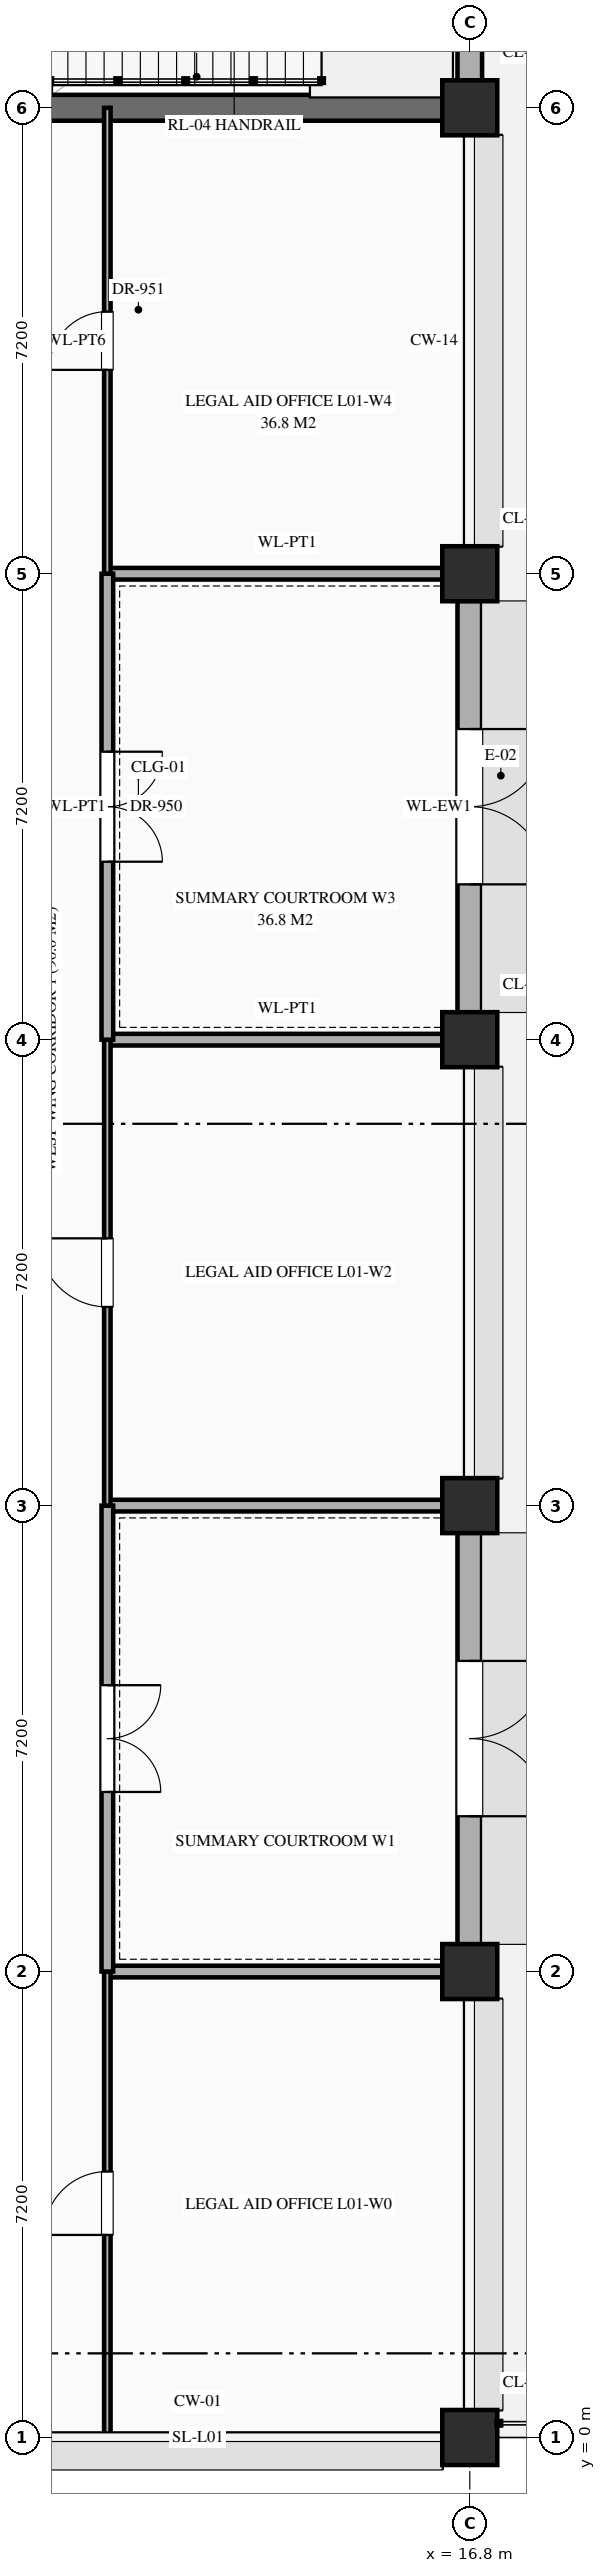
"""IFC4 building model, lengths in metres.
Left out: names, types, materials, properties, quantities, classifications, styles, units other than length and angle.
Written with IfcOpenShell. Run it as: python <this file> out.ifc"""

import sys

from ifc_helpers import new_model, si_unit, direction, frame, frame_2d, origin, origin_2d, place, context, subcontext, project, spatial, rectangle, extrude, element, fill, save


model = new_model("IFC4")
c1 = context("Model", 3, precision=1e-05, world=origin(), true_north=direction((0.0, 1.0)))
c2 = subcontext(c1, "Body", "Model", "MODEL_VIEW")
j1 = project(units=[si_unit("LENGTHUNIT", "METRE"), si_unit("PLANEANGLEUNIT", "RADIAN")], contexts=[c1])
p1 = place(None, origin())
s1 = spatial("IfcSite", under=j1, at=p1, CompositionType="ELEMENT")
p2 = place(p1, origin())
s2 = spatial("IfcBuilding", under=s1, at=p2, CompositionType="ELEMENT")
p3 = place(p2, origin())
s3 = spatial("IfcBuildingStorey", under=s2, at=p3, CompositionType="ELEMENT", Elevation=0.0)
for number, where, z_axis, x_axis in (
    (1, (16.8, 0.0, 0.0), (0.0, 0.0, 1.0), (1.0, 0.0, 0.0)),
    (2, (16.8, 7.2, 0.0), (0.0, 0.0, 1.0), (1.0, 0.0, 0.0)),
    (3, (16.8, 14.4, 0.0), (0.0, 0.0, 1.0), (1.0, 0.0, 0.0)),
    (4, (16.8, 21.6, 0.0), (0.0, 0.0, 1.0), (1.0, 0.0, 0.0)),
    (5, (16.8, 28.8, 0.0), (0.0, 0.0, 1.0), (1.0, 0.0, 0.0)),
    (6, (16.8, 36.0, 0.0), (0.0, 0.0, 1.0), (1.0, 0.0, 0.0)),
):
    element("IfcColumn", number, at=place(p3, frame(where, z_axis=z_axis, x_axis=x_axis)), inside=s3, PredefinedType="COLUMN", context=c2, shape_type="SweptSolid", body=[
        extrude(rectangle(XDim=0.85, YDim=0.85, at=origin_2d()), origin(), (0.0, 0.0, 1.0), 5.4),
    ])
p4 = place(p3, frame((16.8, 7.62, 0.0), z_axis=(0.0, 0.0, 1.0), x_axis=(0.0, 1.0, 0.0)))
e7 = element("IfcWall", 7, at=p4, inside=s3, PredefinedType="STANDARD", context=c2, shape_type="SweptSolid", body=[
    extrude(rectangle(XDim=6.36, YDim=0.38, at=frame_2d((3.18, 0.0))), origin(), (0.0, 0.0, 1.0), 4.47),
])
p5 = place(p4, frame((1.98, 0.0, 0.0)))
e8 = element("IfcOpeningElement", 8, at=p5, cuts=e7, PredefinedType="OPENING", context=c2, shape_type="SweptSolid", body=[
    extrude(rectangle(XDim=2.4, YDim=2.4, at=frame_2d((1.2, 1.2))), frame((0.0, 0.202, 0.0), z_axis=(0.0, -1.0, 0.0), x_axis=(1.0, 0.0, 0.0)), (0.0, 0.0, 1.0), 0.404),
])
p6 = place(p3, frame((16.8, 22.02, 0.0), z_axis=(0.0, 0.0, 1.0), x_axis=(0.0, 1.0, 0.0)))
e9 = element("IfcWall", 9, at=p6, inside=s3, PredefinedType="STANDARD", context=c2, shape_type="SweptSolid", body=[
    extrude(rectangle(XDim=6.36, YDim=0.38, at=frame_2d((3.18, 0.0))), origin(), (0.0, 0.0, 1.0), 4.47),
])
p7 = place(p6, frame((1.98, 0.0, 0.0)))
e10 = element("IfcOpeningElement", 10, at=p7, cuts=e9, PredefinedType="OPENING", context=c2, shape_type="SweptSolid", body=[
    extrude(rectangle(XDim=2.4, YDim=2.4, at=frame_2d((1.2, 1.2))), frame((0.0, 0.202, 0.0), z_axis=(0.0, -1.0, 0.0), x_axis=(1.0, 0.0, 0.0)), (0.0, 0.0, 1.0), 0.404),
])
p8 = place(p3, frame((16.8, 36.42, 0.0), z_axis=(0.0, 0.0, 1.0), x_axis=(0.0, 1.0, 0.0)))
e11 = element("IfcWall", 11, at=p8, inside=s3, PredefinedType="STANDARD", context=c2, shape_type="SweptSolid", body=[
    extrude(rectangle(XDim=6.36, YDim=0.38, at=frame_2d((3.18, 0.0))), origin(), (0.0, 0.0, 1.0), 4.47),
])
p9 = place(p8, frame((4.78, 0.0, 0.0)))
e12 = element("IfcOpeningElement", 12, at=p9, cuts=e11, PredefinedType="OPENING", context=c2, shape_type="SweptSolid", body=[
    extrude(rectangle(XDim=1.2, YDim=2.2, at=frame_2d((0.6, 1.1))), frame((0.0, 0.202, 0.0), z_axis=(0.0, -1.0, 0.0), x_axis=(1.0, 0.0, 0.0)), (0.0, 0.0, 1.0), 0.404),
])
for number, where, z_axis, x_axis in (
    (13, (11.2, 7.2, 0.0), (0.0, 0.0, 1.0), (1.0, 0.0, 0.0)),
    (14, (11.2, 14.4, 0.0), (0.0, 0.0, 1.0), (1.0, 0.0, 0.0)),
    (15, (11.2, 21.6, 0.0), (0.0, 0.0, 1.0), (1.0, 0.0, 0.0)),
    (16, (11.2, 28.8, 0.0), (0.0, 0.0, 1.0), (1.0, 0.0, 0.0)),
):
    element("IfcWall", number, at=place(p3, frame(where, z_axis=z_axis, x_axis=x_axis)), inside=s3, PredefinedType="STANDARD", context=c2, shape_type="SweptSolid", body=[
        extrude(rectangle(XDim=5.56, YDim=0.18, at=frame_2d((2.78, 0.0))), origin(), (0.0, 0.0, 1.0), 4.27),
    ])
p10 = place(p3, frame((8.4, 36.0, 0.0), z_axis=(0.0, 0.0, 1.0), x_axis=(1.0, 0.0, 0.0)))
e17 = element("IfcWall", 17, at=p10, inside=s3, PredefinedType="SHEAR", context=c2, shape_type="SweptSolid", body=[
    extrude(rectangle(XDim=8.36, YDim=0.4, at=frame_2d((4.18, 0.0))), origin(), (0.0, 0.0, 1.0), 5.12),
])
p11 = place(p3, frame((11.2, 0.04, 0.0), z_axis=(0.0, 0.0, 1.0), x_axis=(0.0, 1.0, 0.0)))
e18 = element("IfcWall", 18, at=p11, inside=s3, PredefinedType="STANDARD", context=c2, shape_type="SweptSolid", body=[
    extrude(rectangle(XDim=7.16, YDim=0.1, at=frame_2d((3.58, 0.0))), origin(), (0.0, 0.0, 1.0), 5.12),
])
p12 = place(p11, frame((3.09, 0.0, 0.0)))
e19 = element("IfcOpeningElement", 19, at=p12, cuts=e18, PredefinedType="OPENING", context=c2, shape_type="SweptSolid", body=[
    extrude(rectangle(XDim=0.98, YDim=2.35, at=frame_2d((0.49, 1.175))), frame((0.0, 0.062, 0.0), z_axis=(0.0, -1.0, 0.0), x_axis=(1.0, 0.0, 0.0)), (0.0, 0.0, 1.0), 0.124),
])
p13 = place(p3, frame((11.2, 7.2, 0.0), z_axis=(0.0, 0.0, 1.0), x_axis=(0.0, 1.0, 0.0)))
e20 = element("IfcWall", 20, at=p13, inside=s3, PredefinedType="STANDARD", context=c2, shape_type="SweptSolid", body=[
    extrude(rectangle(XDim=7.2, YDim=0.18, at=frame_2d((3.6, 0.0))), origin(), (0.0, 0.0, 1.0), 5.12),
])
p14 = place(p13, frame((2.775, 0.0, 0.0)))
e21 = element("IfcOpeningElement", 21, at=p14, cuts=e20, PredefinedType="OPENING", context=c2, shape_type="SweptSolid", body=[
    extrude(rectangle(XDim=1.65, YDim=2.4, at=frame_2d((0.825, 1.2))), frame((0.0, 0.102, 0.0), z_axis=(0.0, -1.0, 0.0), x_axis=(1.0, 0.0, 0.0)), (0.0, 0.0, 1.0), 0.204),
])
p15 = place(p3, frame((11.2, 14.4, 0.0), z_axis=(0.0, 0.0, 1.0), x_axis=(0.0, 1.0, 0.0)))
e22 = element("IfcWall", 22, at=p15, inside=s3, PredefinedType="STANDARD", context=c2, shape_type="SweptSolid", body=[
    extrude(rectangle(XDim=7.2, YDim=0.1, at=frame_2d((3.6, 0.0))), origin(), (0.0, 0.0, 1.0), 5.12),
])
p16 = place(p15, frame((3.07, 0.0, 0.0)))
e23 = element("IfcOpeningElement", 23, at=p16, cuts=e22, PredefinedType="OPENING", context=c2, shape_type="SweptSolid", body=[
    extrude(rectangle(XDim=1.06, YDim=2.4, at=frame_2d((0.53, 1.2))), frame((0.0, 0.062, 0.0), z_axis=(0.0, -1.0, 0.0), x_axis=(1.0, 0.0, 0.0)), (0.0, 0.0, 1.0), 0.124),
])
p17 = place(p3, frame((11.2, 21.6, 0.0), z_axis=(0.0, 0.0, 1.0), x_axis=(0.0, 1.0, 0.0)))
e24 = element("IfcWall", 24, at=p17, inside=s3, PredefinedType="STANDARD", context=c2, shape_type="SweptSolid", body=[
    extrude(rectangle(XDim=7.2, YDim=0.18, at=frame_2d((3.6, 0.0))), origin(), (0.0, 0.0, 1.0), 5.12),
])
p18 = place(p17, frame((2.75, 0.0, 0.0)))
e25 = element("IfcOpeningElement", 25, at=p18, cuts=e24, PredefinedType="OPENING", context=c2, shape_type="SweptSolid", body=[
    extrude(rectangle(XDim=1.7, YDim=2.45, at=frame_2d((0.85, 1.225))), frame((0.0, 0.102, 0.0), z_axis=(0.0, -1.0, 0.0), x_axis=(1.0, 0.0, 0.0)), (0.0, 0.0, 1.0), 0.204),
])
p19 = place(p3, frame((11.2, 28.8, 0.0), z_axis=(0.0, 0.0, 1.0), x_axis=(0.0, 1.0, 0.0)))
e26 = element("IfcWall", 26, at=p19, inside=s3, PredefinedType="STANDARD", context=c2, shape_type="SweptSolid", body=[
    extrude(rectangle(XDim=7.2, YDim=0.1, at=frame_2d((3.6, 0.0))), origin(), (0.0, 0.0, 1.0), 5.12),
])
p20 = place(p19, frame((3.15, 0.0, 0.0)))
e27 = element("IfcOpeningElement", 27, at=p20, cuts=e26, PredefinedType="OPENING", context=c2, shape_type="SweptSolid", body=[
    extrude(rectangle(XDim=0.9, YDim=2.15, at=frame_2d((0.45, 1.075))), frame((0.0, 0.062, 0.0), z_axis=(0.0, -1.0, 0.0), x_axis=(1.0, 0.0, 0.0)), (0.0, 0.0, 1.0), 0.124),
])
p21 = place(p5, frame((2.4, 0.0, 0.0), z_axis=(0.0, 0.0, 1.0), x_axis=(-1.0, 0.0, 0.0)))
e28 = element("IfcDoor", 28, at=p21, inside=s3, OperationType="DOUBLE_DOOR_SINGLE_SWING", PredefinedType="DOOR", context=c2, shape_type="SweptSolid", body=[
    extrude(rectangle(XDim=2.4, YDim=2.4, at=frame_2d((1.2, 1.2))), frame((0.0, 0.025, 0.0), z_axis=(0.0, -1.0, 0.0), x_axis=(1.0, 0.0, 0.0)), (0.0, 0.0, 1.0), 0.05),
])
fill(e8, e28)
p22 = place(p7, frame((2.4, 0.0, 0.0), z_axis=(0.0, 0.0, 1.0), x_axis=(-1.0, 0.0, 0.0)))
e29 = element("IfcDoor", 29, at=p22, inside=s3, OperationType="DOUBLE_DOOR_SINGLE_SWING", PredefinedType="DOOR", context=c2, shape_type="SweptSolid", body=[
    extrude(rectangle(XDim=2.4, YDim=2.4, at=frame_2d((1.2, 1.2))), frame((0.0, 0.025, 0.0), z_axis=(0.0, -1.0, 0.0), x_axis=(1.0, 0.0, 0.0)), (0.0, 0.0, 1.0), 0.05),
])
fill(e10, e29)
p23 = place(p12, origin())
e30 = element("IfcDoor", 30, at=p23, inside=s3, OperationType="SINGLE_SWING_LEFT", PredefinedType="DOOR", context=c2, shape_type="SweptSolid", body=[
    extrude(rectangle(XDim=0.98, YDim=2.35, at=frame_2d((0.49, 1.175))), frame((0.0, 0.025, 0.0), z_axis=(0.0, -1.0, 0.0), x_axis=(1.0, 0.0, 0.0)), (0.0, 0.0, 1.0), 0.05),
])
fill(e19, e30)
p24 = place(p14, frame((1.65, 0.0, 0.0), z_axis=(0.0, 0.0, 1.0), x_axis=(-1.0, 0.0, 0.0)))
e31 = element("IfcDoor", 31, at=p24, inside=s3, OperationType="DOUBLE_DOOR_SINGLE_SWING", PredefinedType="DOOR", context=c2, shape_type="SweptSolid", body=[
    extrude(rectangle(XDim=1.65, YDim=2.4, at=frame_2d((0.825, 1.2))), frame((0.0, 0.025, 0.0), z_axis=(0.0, -1.0, 0.0), x_axis=(1.0, 0.0, 0.0)), (0.0, 0.0, 1.0), 0.05),
])
fill(e21, e31)
p25 = place(p16, origin())
e32 = element("IfcDoor", 32, at=p25, inside=s3, OperationType="SINGLE_SWING_RIGHT", PredefinedType="DOOR", context=c2, shape_type="SweptSolid", body=[
    extrude(rectangle(XDim=1.06, YDim=2.4, at=frame_2d((0.53, 1.2))), frame((0.0, 0.025, 0.0), z_axis=(0.0, -1.0, 0.0), x_axis=(1.0, 0.0, 0.0)), (0.0, 0.0, 1.0), 0.05),
])
fill(e23, e32)
p26 = place(p18, frame((1.7, 0.0, 0.0), z_axis=(0.0, 0.0, 1.0), x_axis=(-1.0, 0.0, 0.0)))
e33 = element("IfcDoor", 33, at=p26, inside=s3, OperationType="DOUBLE_DOOR_SINGLE_SWING", PredefinedType="DOOR", context=c2, shape_type="SweptSolid", body=[
    extrude(rectangle(XDim=1.7, YDim=2.45, at=frame_2d((0.85, 1.225))), frame((0.0, 0.025, 0.0), z_axis=(0.0, -1.0, 0.0), x_axis=(1.0, 0.0, 0.0)), (0.0, 0.0, 1.0), 0.05),
])
fill(e25, e33)
p27 = place(p20, origin())
e34 = element("IfcDoor", 34, at=p27, inside=s3, OperationType="SINGLE_SWING_LEFT", PredefinedType="DOOR", context=c2, shape_type="SweptSolid", body=[
    extrude(rectangle(XDim=0.9, YDim=2.15, at=frame_2d((0.45, 1.075))), frame((0.0, 0.025, 0.0), z_axis=(0.0, -1.0, 0.0), x_axis=(1.0, 0.0, 0.0)), (0.0, 0.0, 1.0), 0.05),
])
fill(e27, e34)
save(model, sys.argv[1])
